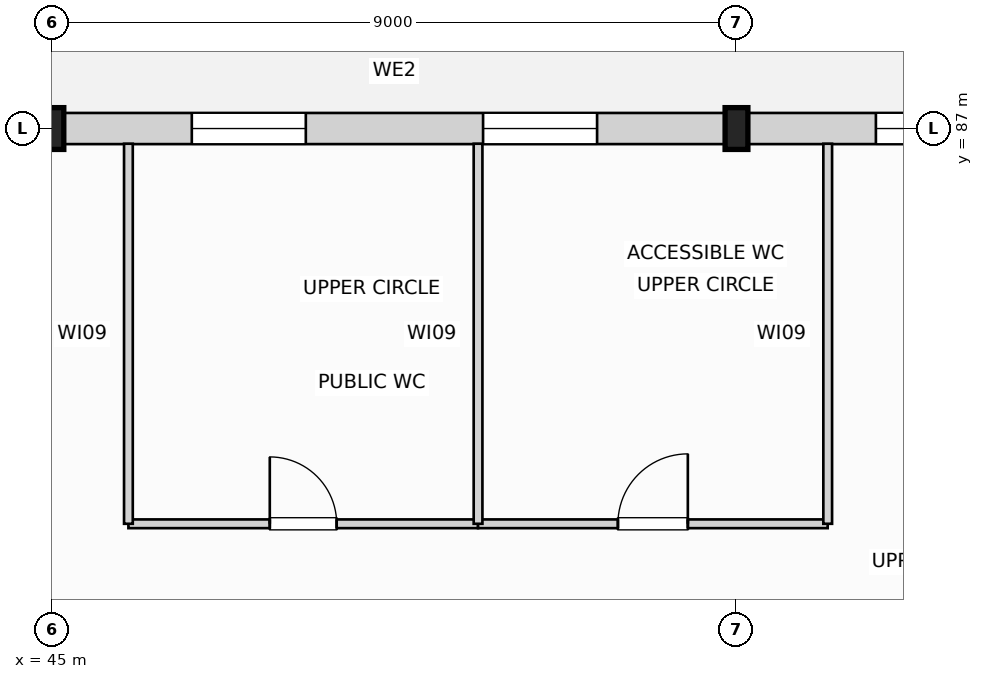
"""IFC4 building model, lengths in metres.
Left out: names, types, materials, properties, quantities, classifications, styles, units other than length and angle.
Written with IfcOpenShell. Run it as: python <this file> out.ifc"""

import sys

from ifc_helpers import new_model, si_unit, direction, frame, frame_2d, origin, origin_2d, place, context, subcontext, project, spatial, rectangle, i_section, extrude, element, fill, save


model = new_model("IFC4")
c1 = context("Model", 3, precision=1e-05, world=origin(), true_north=direction((0.0, 1.0)))
c2 = subcontext(c1, "Body", "Model", "MODEL_VIEW")
j1 = project(units=[si_unit("LENGTHUNIT", "METRE"), si_unit("PLANEANGLEUNIT", "RADIAN")], contexts=[c1])
p1 = place(None, origin())
s1 = spatial("IfcSite", under=j1, at=p1, CompositionType="ELEMENT")
p2 = place(p1, origin())
s2 = spatial("IfcBuilding", under=s1, at=p2, CompositionType="ELEMENT")
p3 = place(p2, frame((0.0, 0.0, 21.6)))
s3 = spatial("IfcBuildingStorey", under=s2, at=p3, CompositionType="ELEMENT", Elevation=21.6)
for number, where, z_axis, x_axis in (
    (1, (45.0, 87.0, 0.0), (0.0, 0.0, 1.0), (1.0, 0.0, 0.0)),
    (2, (54.0, 87.0, 0.0), (0.0, 0.0, 1.0), (1.0, 0.0, 0.0)),
):
    element("IfcColumn", number, at=place(p3, frame(where, z_axis=z_axis, x_axis=x_axis)), inside=s3, PredefinedType="COLUMN", context=c2, shape_type="SweptSolid", body=[
        extrude(i_section(OverallWidth=0.3, OverallDepth=0.55, WebThickness=0.015, FlangeThickness=0.029, at=origin_2d()), origin(), (0.0, 0.0, 1.0), 4.8),
    ])
p4 = place(p3, frame((45.145, 87.0, 0.0), z_axis=(0.0, 0.0, 1.0), x_axis=(1.0, 0.0, 0.0)))
e3 = element("IfcWall", 3, at=p4, inside=s3, PredefinedType="SOLIDWALL", context=c2, shape_type="SweptSolid", body=[
    extrude(rectangle(XDim=8.71, YDim=0.41, at=frame_2d((4.355, 0.0))), origin(), (0.0, 0.0, 1.0), 3.555),
])
p5 = place(p4, frame((1.689, 0.0, 0.85)))
e4 = element("IfcOpeningElement", 4, at=p5, cuts=e3, PredefinedType="OPENING", context=c2, shape_type="SweptSolid", body=[
    extrude(rectangle(XDim=1.5, YDim=2.3, at=frame_2d((0.75, 1.15))), frame((0.0, 0.215, 0.0), z_axis=(0.0, -1.0, 0.0), x_axis=(1.0, 0.0, 0.0)), (0.0, 0.0, 1.0), 0.43),
])
p6 = place(p4, frame((5.521, 0.0, 0.85)))
e5 = element("IfcOpeningElement", 5, at=p6, cuts=e3, PredefinedType="OPENING", context=c2, shape_type="SweptSolid", body=[
    extrude(rectangle(XDim=1.5, YDim=2.3, at=frame_2d((0.75, 1.15))), frame((0.0, 0.215, 0.0), z_axis=(0.0, -1.0, 0.0), x_axis=(1.0, 0.0, 0.0)), (0.0, 0.0, 1.0), 0.43),
])
p7 = place(p3, frame((54.145, 87.0, 0.0), z_axis=(0.0, 0.0, 1.0), x_axis=(1.0, 0.0, 0.0)))
e6 = element("IfcWall", 6, at=p7, inside=s3, PredefinedType="SOLIDWALL", context=c2, shape_type="SweptSolid", body=[
    extrude(rectangle(XDim=8.71, YDim=0.41, at=frame_2d((4.355, 0.0))), origin(), (0.0, 0.0, 1.0), 3.555),
])
p8 = place(p7, frame((1.689, 0.0, 0.85)))
e7 = element("IfcOpeningElement", 7, at=p8, cuts=e6, PredefinedType="OPENING", context=c2, shape_type="SweptSolid", body=[
    extrude(rectangle(XDim=1.5, YDim=2.3, at=frame_2d((0.75, 1.15))), frame((0.0, 0.215, 0.0), z_axis=(0.0, -1.0, 0.0), x_axis=(1.0, 0.0, 0.0)), (0.0, 0.0, 1.0), 0.43),
])
p9 = place(p7, frame((5.521, 0.0, 0.85)))
e8 = element("IfcOpeningElement", 8, at=p9, cuts=e6, PredefinedType="OPENING", context=c2, shape_type="SweptSolid", body=[
    extrude(rectangle(XDim=1.5, YDim=2.3, at=frame_2d((0.75, 1.15))), frame((0.0, 0.215, 0.0), z_axis=(0.0, -1.0, 0.0), x_axis=(1.0, 0.0, 0.0)), (0.0, 0.0, 1.0), 0.43),
])
p10 = place(p3, frame((46.0, 81.8, 0.0), z_axis=(0.0, 0.0, 1.0), x_axis=(1.0, 0.0, 0.0)))
e9 = element("IfcWall", 9, at=p10, inside=s3, PredefinedType="PARTITIONING", context=c2, shape_type="SweptSolid", body=[
    extrude(rectangle(XDim=4.6, YDim=0.115, at=frame_2d((2.3, 0.0))), origin(), (0.0, 0.0, 1.0), 4.505),
])
p11 = place(p10, frame((1.86, 0.0, 0.0)))
e10 = element("IfcOpeningElement", 10, at=p11, cuts=e9, PredefinedType="OPENING", context=c2, shape_type="SweptSolid", body=[
    extrude(rectangle(XDim=0.88, YDim=2.06, at=frame_2d((0.44, 1.03))), frame((0.0, 0.067, 0.0), z_axis=(0.0, -1.0, 0.0), x_axis=(1.0, 0.0, 0.0)), (0.0, 0.0, 1.0), 0.135),
])
p12 = place(p3, frame((50.6, 81.8, 0.0), z_axis=(0.0, 0.0, 1.0), x_axis=(1.0, 0.0, 0.0)))
e11 = element("IfcWall", 11, at=p12, inside=s3, PredefinedType="PARTITIONING", context=c2, shape_type="SweptSolid", body=[
    extrude(rectangle(XDim=4.6, YDim=0.115, at=frame_2d((2.3, 0.0))), origin(), (0.0, 0.0, 1.0), 4.115),
])
p13 = place(p12, frame((1.84, 0.0, 0.0)))
e12 = element("IfcOpeningElement", 12, at=p13, cuts=e11, PredefinedType="OPENING", context=c2, shape_type="SweptSolid", body=[
    extrude(rectangle(XDim=0.92, YDim=2.08, at=frame_2d((0.46, 1.04))), frame((0.0, 0.067, 0.0), z_axis=(0.0, -1.0, 0.0), x_axis=(1.0, 0.0, 0.0)), (0.0, 0.0, 1.0), 0.135),
])
for number, where, z_axis, x_axis in (
    (13, (46.0, 81.8, 0.0), (0.0, 0.0, 1.0), (0.0, 1.0, 0.0)),
    (14, (50.6, 81.8, 0.0), (0.0, 0.0, 1.0), (0.0, 1.0, 0.0)),
):
    element("IfcWall", number, at=place(p3, frame(where, z_axis=z_axis, x_axis=x_axis)), inside=s3, PredefinedType="PARTITIONING", context=c2, shape_type="SweptSolid", body=[
        extrude(rectangle(XDim=5.0, YDim=0.115, at=frame_2d((2.5, 0.0))), origin(), (0.0, 0.0, 1.0), 4.005),
    ])
p14 = place(p3, frame((55.2, 81.8, 0.0), z_axis=(0.0, 0.0, 1.0), x_axis=(0.0, 1.0, 0.0)))
e15 = element("IfcWall", 15, at=p14, inside=s3, PredefinedType="PARTITIONING", context=c2, shape_type="SweptSolid", body=[
    extrude(rectangle(XDim=5.0, YDim=0.115, at=frame_2d((2.5, 0.0))), origin(), (0.0, 0.0, 1.0), 3.555),
])
p15 = place(p5, origin())
e16 = element("IfcWindow", 16, at=p15, inside=s3, PartitioningType="SINGLE_PANEL", PredefinedType="WINDOW", context=c2, shape_type="SweptSolid", body=[
    extrude(rectangle(XDim=1.5, YDim=2.3, at=frame_2d((0.75, 1.15))), frame((0.0, 0.03, 0.0), z_axis=(0.0, -1.0, 0.0), x_axis=(1.0, 0.0, 0.0)), (0.0, 0.0, 1.0), 0.06),
])
fill(e4, e16)
p16 = place(p6, origin())
e17 = element("IfcWindow", 17, at=p16, inside=s3, PartitioningType="SINGLE_PANEL", PredefinedType="WINDOW", context=c2, shape_type="SweptSolid", body=[
    extrude(rectangle(XDim=1.5, YDim=2.3, at=frame_2d((0.75, 1.15))), frame((0.0, 0.03, 0.0), z_axis=(0.0, -1.0, 0.0), x_axis=(1.0, 0.0, 0.0)), (0.0, 0.0, 1.0), 0.06),
])
fill(e5, e17)
p17 = place(p8, origin())
e18 = element("IfcWindow", 18, at=p17, inside=s3, PartitioningType="SINGLE_PANEL", PredefinedType="WINDOW", context=c2, shape_type="SweptSolid", body=[
    extrude(rectangle(XDim=1.5, YDim=2.3, at=frame_2d((0.75, 1.15))), frame((0.0, 0.03, 0.0), z_axis=(0.0, -1.0, 0.0), x_axis=(1.0, 0.0, 0.0)), (0.0, 0.0, 1.0), 0.06),
])
fill(e7, e18)
p18 = place(p11, origin())
e19 = element("IfcDoor", 19, at=p18, inside=s3, OperationType="SINGLE_SWING_LEFT", PredefinedType="DOOR", context=c2, shape_type="SweptSolid", body=[
    extrude(rectangle(XDim=0.88, YDim=2.06, at=frame_2d((0.44, 1.03))), frame((0.0, 0.025, 0.0), z_axis=(0.0, -1.0, 0.0), x_axis=(1.0, 0.0, 0.0)), (0.0, 0.0, 1.0), 0.05),
])
fill(e10, e19)
p19 = place(p13, origin())
e20 = element("IfcDoor", 20, at=p19, inside=s3, OperationType="SINGLE_SWING_RIGHT", PredefinedType="DOOR", context=c2, shape_type="SweptSolid", body=[
    extrude(rectangle(XDim=0.92, YDim=2.08, at=frame_2d((0.46, 1.04))), frame((0.0, 0.025, 0.0), z_axis=(0.0, -1.0, 0.0), x_axis=(1.0, 0.0, 0.0)), (0.0, 0.0, 1.0), 0.05),
])
fill(e12, e20)
save(model, sys.argv[1])
